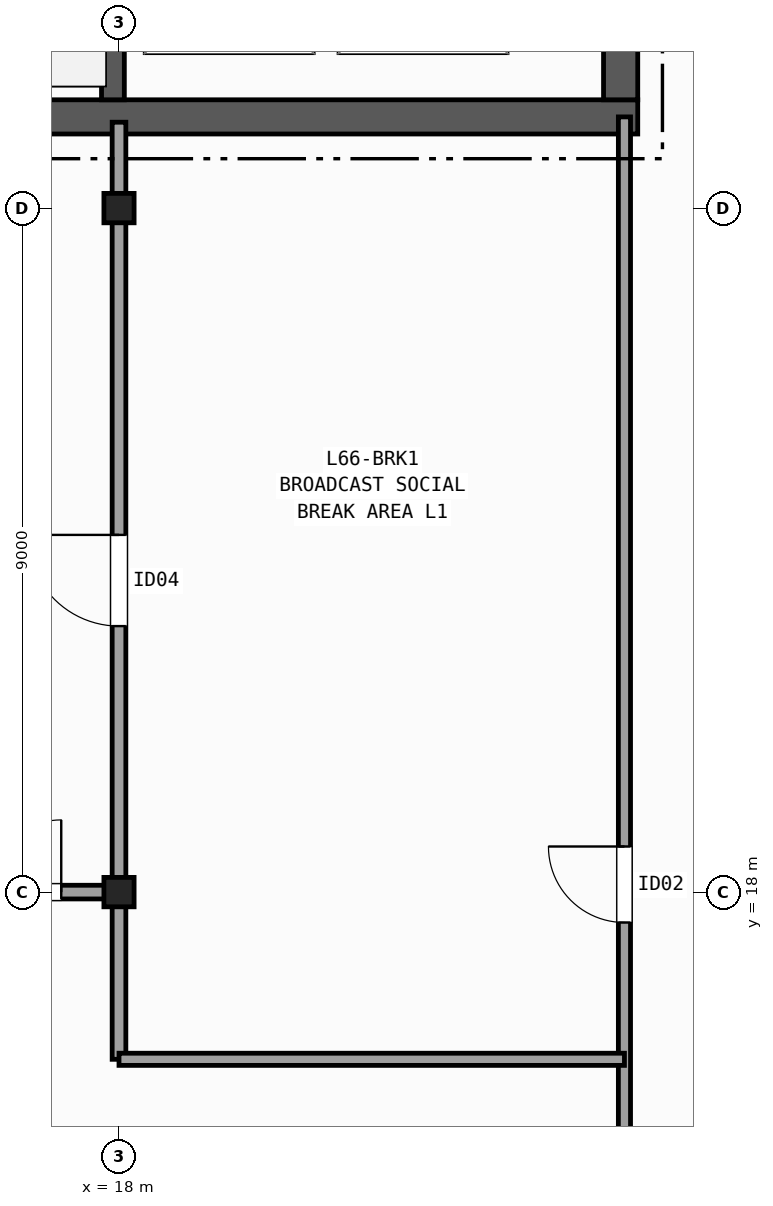
"""IFC4 building model, lengths in metres.
Left out: names, types, materials, properties, quantities, classifications, styles, units other than length and angle.
Written with IfcOpenShell. Run it as: python <this file> out.ifc"""

import sys

from ifc_helpers import new_model, si_unit, direction, frame, frame_2d, origin, origin_2d, place, context, subcontext, project, spatial, rectangle, i_section, extrude, element, fill, save


model = new_model("IFC4")
c1 = context("Model", 3, precision=1e-05, world=origin(), true_north=direction((0.0, 1.0)))
c2 = subcontext(c1, "Body", "Model", "MODEL_VIEW")
j1 = project(units=[si_unit("LENGTHUNIT", "METRE"), si_unit("PLANEANGLEUNIT", "RADIAN")], contexts=[c1])
p1 = place(None, origin())
s1 = spatial("IfcSite", under=j1, at=p1, CompositionType="ELEMENT")
p2 = place(p1, origin())
s2 = spatial("IfcBuilding", under=s1, at=p2, CompositionType="ELEMENT")
p3 = place(p2, frame((0.0, 0.0, 263.0)))
s3 = spatial("IfcBuildingStorey", under=s2, at=p3, CompositionType="ELEMENT", Elevation=263.0)
for number, where, z_axis, x_axis in (
    (1, (18.0, 18.0, 0.0), (0.0, 0.0, 1.0), (1.0, 0.0, 0.0)),
    (2, (18.0, 27.0, 0.0), (0.0, 0.0, 1.0), (1.0, 0.0, 0.0)),
):
    element("IfcColumn", number, at=place(p3, frame(where, z_axis=z_axis, x_axis=x_axis)), inside=s3, PredefinedType="COLUMN", context=c2, shape_type="SweptSolid", body=[
        extrude(i_section(OverallWidth=0.397, OverallDepth=0.387, WebThickness=0.021, FlangeThickness=0.033, FilletRadius=0.015, at=origin_2d()), origin(), (0.0, 0.0, 1.0), 3.7),
    ])
p4 = place(p3, frame((10.975, 28.2, 0.0), z_axis=(0.0, 0.0, 1.0), x_axis=(1.0, 0.0, 0.0)))
e3 = element("IfcWall", 3, at=p4, inside=s3, PredefinedType="SHEAR", context=c2, shape_type="SweptSolid", body=[
    extrude(rectangle(XDim=13.85, YDim=0.45, at=frame_2d((6.925, 0.0))), origin(), (0.0, 0.0, 1.0), 3.42),
])
p5 = place(p3, frame((24.6, 28.425, 0.0), z_axis=(0.0, 0.0, 1.0), x_axis=(0.0, 1.0, 0.0)))
e4 = element("IfcWall", 4, at=p5, inside=s3, PredefinedType="SHEAR", context=c2, shape_type="SweptSolid", body=[
    extrude(rectangle(XDim=13.75, YDim=0.45, at=frame_2d((6.875, 0.0))), origin(), (0.0, 0.0, 1.0), 3.42),
])
p6 = place(p5, frame((3.375, 0.0, 0.0)))
e5 = element("IfcOpeningElement", 5, at=p6, cuts=e4, PredefinedType="OPENING", context=c2, shape_type="SweptSolid", body=[
    extrude(rectangle(XDim=1.5, YDim=2.2, at=frame_2d((0.75, 1.1))), frame((0.0, 0.235, 0.0), z_axis=(0.0, -1.0, 0.0), x_axis=(1.0, 0.0, 0.0)), (0.0, 0.0, 1.0), 0.47),
])
p7 = place(p5, frame((9.975, 0.0, 0.0)))
e6 = element("IfcOpeningElement", 6, at=p7, cuts=e4, PredefinedType="OPENING", context=c2, shape_type="SweptSolid", body=[
    extrude(rectangle(XDim=0.9, YDim=2.1, at=frame_2d((0.45, 1.05))), frame((0.0, 0.235, 0.0), z_axis=(0.0, -1.0, 0.0), x_axis=(1.0, 0.0, 0.0)), (0.0, 0.0, 1.0), 0.47),
])
p8 = place(p5, frame((12.075, 0.0, 0.0)))
e7 = element("IfcOpeningElement", 7, at=p8, cuts=e4, PredefinedType="OPENING", context=c2, shape_type="SweptSolid", body=[
    extrude(rectangle(XDim=0.9, YDim=2.1, at=frame_2d((0.45, 1.05))), frame((0.0, 0.235, 0.0), z_axis=(0.0, -1.0, 0.0), x_axis=(1.0, 0.0, 0.0)), (0.0, 0.0, 1.0), 0.47),
])
p9 = place(p3, frame((17.92, 42.175, 0.0), z_axis=(0.0, 0.0, 1.0), x_axis=(0.0, -1.0, 0.0)))
e8 = element("IfcWall", 8, at=p9, inside=s3, PredefinedType="SHEAR", context=c2, shape_type="SweptSolid", body=[
    extrude(rectangle(XDim=13.75, YDim=0.3, at=frame_2d((6.875, 0.0))), origin(), (0.0, 0.0, 1.0), 3.42),
])
p10 = place(p9, frame((2.0, 0.0, 0.0)))
e9 = element("IfcOpeningElement", 9, at=p10, cuts=e8, PredefinedType="OPENING", context=c2, shape_type="SweptSolid", body=[
    extrude(rectangle(XDim=1.15, YDim=2.15, at=frame_2d((0.575, 1.075))), frame((0.0, 0.16, 0.0), z_axis=(0.0, -1.0, 0.0), x_axis=(1.0, 0.0, 0.0)), (0.0, 0.0, 1.0), 0.32),
])
p11 = place(p3, frame((24.65, 9.0, 0.0), z_axis=(0.0, 0.0, 1.0), x_axis=(0.0, 1.0, 0.0)))
e10 = element("IfcWall", 10, at=p11, inside=s3, PredefinedType="PARTITIONING", context=c2, shape_type="SweptSolid", body=[
    extrude(rectangle(XDim=19.2, YDim=0.16, at=frame_2d((9.6, 0.0))), origin(), (0.0, 0.0, 1.0), 2.707),
])
p12 = place(p11, frame((8.6, 0.0, 0.0)))
e11 = element("IfcOpeningElement", 11, at=p12, cuts=e10, PredefinedType="OPENING", context=c2, shape_type="SweptSolid", body=[
    extrude(rectangle(XDim=1.0, YDim=2.1, at=frame_2d((0.5, 1.05))), frame((0.0, 0.09, 0.0), z_axis=(0.0, -1.0, 0.0), x_axis=(1.0, 0.0, 0.0)), (0.0, 0.0, 1.0), 0.18),
])
p13 = place(p11, frame((2.55, 0.0, 0.0)))
e12 = element("IfcOpeningElement", 12, at=p13, cuts=e10, PredefinedType="OPENING", context=c2, shape_type="SweptSolid", body=[
    extrude(rectangle(XDim=1.05, YDim=2.15, at=frame_2d((0.525, 1.075))), frame((0.0, 0.09, 0.0), z_axis=(0.0, -1.0, 0.0), x_axis=(1.0, 0.0, 0.0)), (0.0, 0.0, 1.0), 0.18),
])
p14 = place(p3, frame((9.0, 18.0, 0.0), z_axis=(0.0, 0.0, 1.0), x_axis=(1.0, 0.0, 0.0)))
e13 = element("IfcWall", 13, at=p14, inside=s3, PredefinedType="PARTITIONING", context=c2, shape_type="SweptSolid", body=[
    extrude(rectangle(XDim=9.08, YDim=0.18, at=frame_2d((4.54, 0.0))), origin(), (0.0, 0.0, 1.0), 2.707),
])
p15 = place(p14, frame((7.29, 0.0, 0.0)))
e14 = element("IfcOpeningElement", 14, at=p15, cuts=e13, PredefinedType="OPENING", context=c2, shape_type="SweptSolid", body=[
    extrude(rectangle(XDim=0.95, YDim=2.1, at=frame_2d((0.475, 1.05))), frame((0.0, 0.1, 0.0), z_axis=(0.0, -1.0, 0.0), x_axis=(1.0, 0.0, 0.0)), (0.0, 0.0, 1.0), 0.2),
])
p16 = place(p3, frame((18.0, 15.8, 0.0), z_axis=(0.0, 0.0, 1.0), x_axis=(0.0, 1.0, 0.0)))
e15 = element("IfcWall", 15, at=p16, inside=s3, PredefinedType="PARTITIONING", context=c2, shape_type="SweptSolid", body=[
    extrude(rectangle(XDim=12.33, YDim=0.18, at=frame_2d((6.165, 0.0))), origin(), (0.0, 0.0, 1.0), 2.789),
])
p17 = place(p16, frame((5.7, 0.0, 0.0)))
e16 = element("IfcOpeningElement", 16, at=p17, cuts=e15, PredefinedType="OPENING", context=c2, shape_type="SweptSolid", body=[
    extrude(rectangle(XDim=1.2, YDim=2.15, at=frame_2d((0.6, 1.075))), frame((0.0, 0.1, 0.0), z_axis=(0.0, -1.0, 0.0), x_axis=(1.0, 0.0, 0.0)), (0.0, 0.0, 1.0), 0.2),
])
p18 = place(p3, frame((18.0, 15.8, 0.0), z_axis=(0.0, 0.0, 1.0), x_axis=(1.0, 0.0, 0.0)))
e17 = element("IfcWall", 17, at=p18, inside=s3, PredefinedType="PARTITIONING", context=c2, shape_type="SweptSolid", body=[
    extrude(rectangle(XDim=6.65, YDim=0.16, at=frame_2d((3.325, 0.0))), origin(), (0.0, 0.0, 1.0), 2.789),
])
p19 = place(p12, origin())
e18 = element("IfcDoor", 18, at=p19, inside=s3, OperationType="SINGLE_SWING_RIGHT", PredefinedType="DOOR", context=c2, shape_type="SweptSolid", body=[
    extrude(rectangle(XDim=1.0, YDim=2.1, at=frame_2d((0.5, 1.05))), frame((0.0, 0.025, 0.0), z_axis=(0.0, -1.0, 0.0), x_axis=(1.0, 0.0, 0.0)), (0.0, 0.0, 1.0), 0.05),
])
fill(e11, e18)
p20 = place(p17, origin())
e19 = element("IfcDoor", 19, at=p20, inside=s3, OperationType="SINGLE_SWING_RIGHT", PredefinedType="DOOR", context=c2, shape_type="SweptSolid", body=[
    extrude(rectangle(XDim=1.2, YDim=2.15, at=frame_2d((0.6, 1.075))), frame((0.0, 0.025, 0.0), z_axis=(0.0, -1.0, 0.0), x_axis=(1.0, 0.0, 0.0)), (0.0, 0.0, 1.0), 0.05),
])
fill(e16, e19)
p21 = place(p15, origin())
e20 = element("IfcDoor", 20, at=p21, inside=s3, OperationType="SINGLE_SWING_RIGHT", PredefinedType="DOOR", context=c2, shape_type="SweptSolid", body=[
    extrude(rectangle(XDim=0.95, YDim=2.1, at=frame_2d((0.475, 1.05))), frame((0.0, 0.025, 0.0), z_axis=(0.0, -1.0, 0.0), x_axis=(1.0, 0.0, 0.0)), (0.0, 0.0, 1.0), 0.05),
])
fill(e14, e20)
save(model, sys.argv[1])
